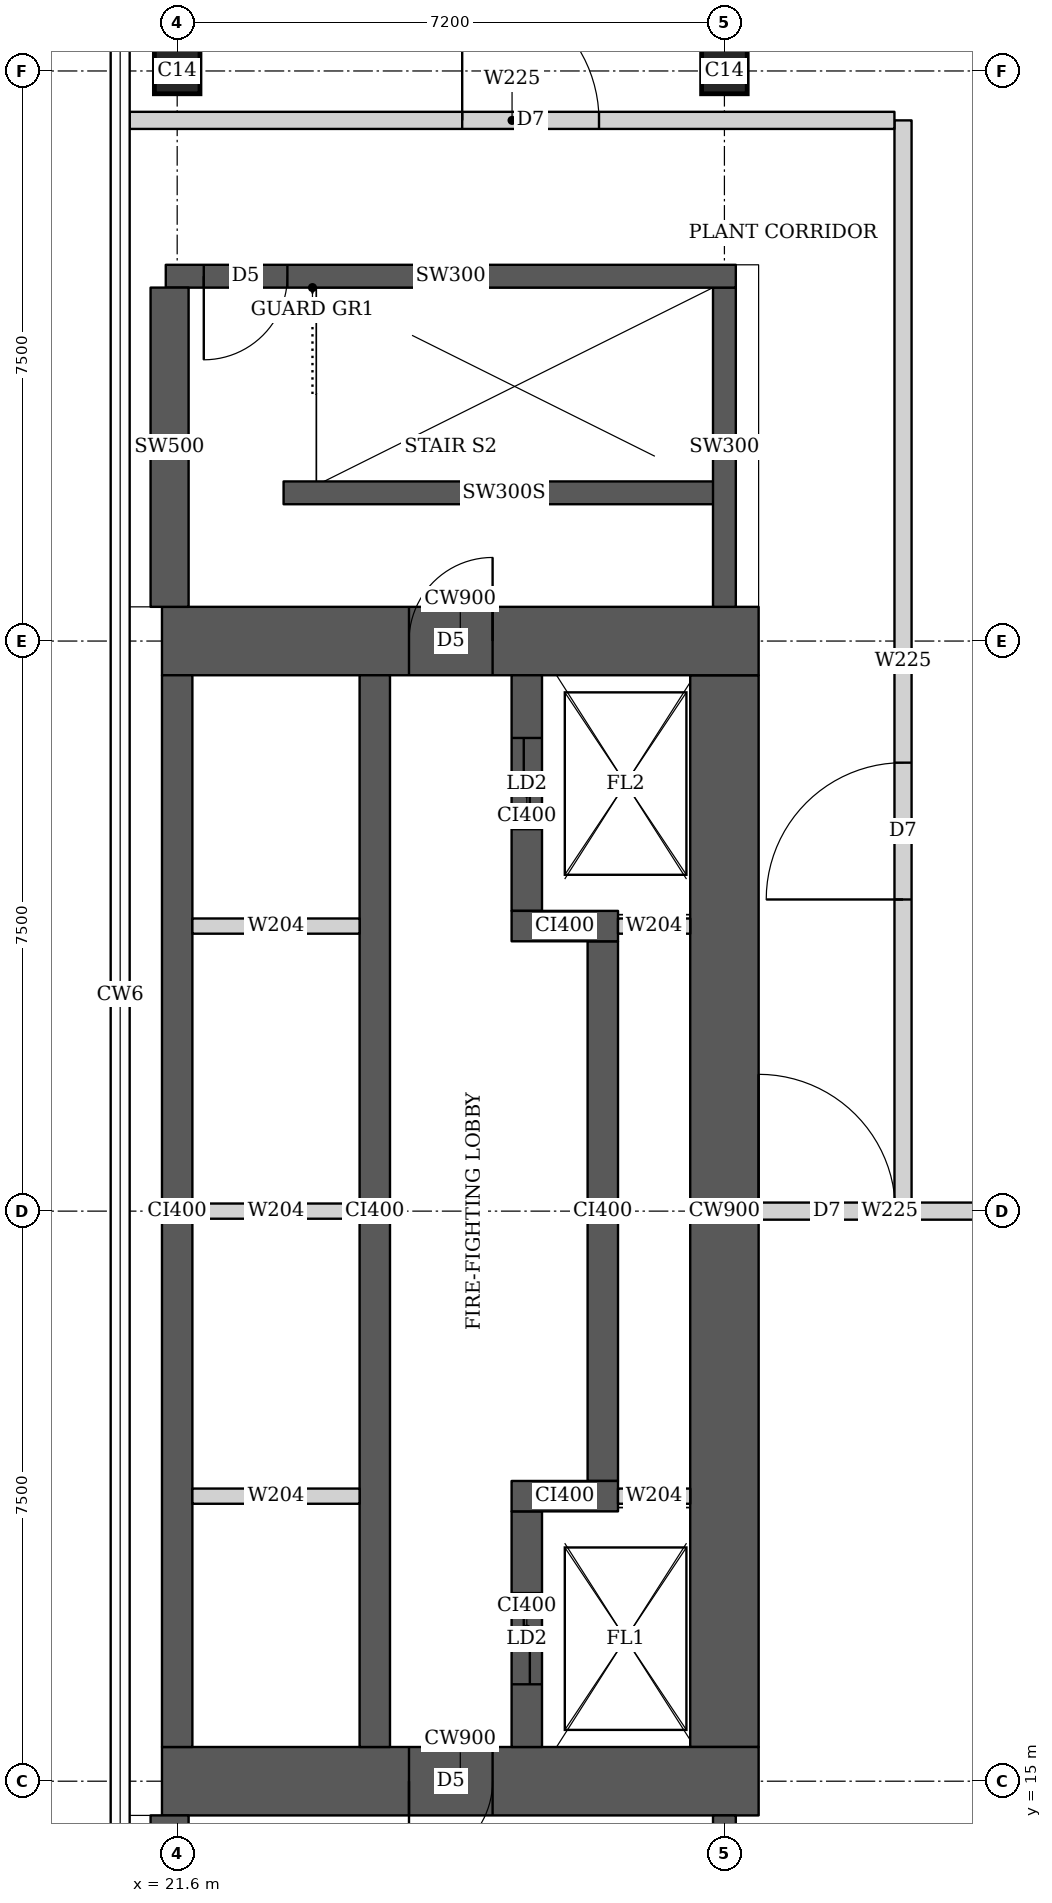
"""IFC4 building model, lengths in metres.
Left out: names, types, materials, properties, quantities, classifications, styles, units other than length and angle.
Written with IfcOpenShell. Run it as: python <this file> out.ifc"""

import sys

from ifc_helpers import new_model, si_unit, direction, frame, frame_2d, origin, origin_2d, place, context, subcontext, project, spatial, rectangle, extrude, element, fill, save


model = new_model("IFC4")
c1 = context("Model", 3, precision=1e-05, world=origin(), true_north=direction((0.0, 1.0)))
c2 = subcontext(c1, "Body", "Model", "MODEL_VIEW")
j1 = project(units=[si_unit("LENGTHUNIT", "METRE"), si_unit("PLANEANGLEUNIT", "RADIAN")], contexts=[c1])
p1 = place(None, origin())
s1 = spatial("IfcSite", under=j1, at=p1, CompositionType="ELEMENT")
p2 = place(p1, origin())
s2 = spatial("IfcBuilding", under=s1, at=p2, CompositionType="ELEMENT")
p3 = place(p2, frame((0.0, 0.0, 301.6)))
s3 = spatial("IfcBuildingStorey", under=s2, at=p3, CompositionType="ELEMENT", Elevation=301.6)
for number, where, z_axis, x_axis in (
    (1, (21.6, 37.5, 0.0), (0.0, 0.0, 1.0), (1.0, 0.0, 0.0)),
    (2, (28.8, 37.5, 0.0), (0.0, 0.0, 1.0), (1.0, 0.0, 0.0)),
):
    element("IfcColumn", number, at=place(p3, frame(where, z_axis=z_axis, x_axis=x_axis)), inside=s3, PredefinedType="COLUMN", context=c2, shape_type="SweptSolid", body=[
        extrude(rectangle(XDim=0.6, YDim=0.6, at=origin_2d()), origin(), (0.0, 0.0, 1.0), 5.6),
    ])
p4 = place(p3, frame((21.4, 15.0, 0.0), z_axis=(0.0, 0.0, 1.0), x_axis=(1.0, 0.0, 0.0)))
e3 = element("IfcWall", 3, at=p4, inside=s3, PredefinedType="SHEAR", context=c2, shape_type="SweptSolid", body=[
    extrude(rectangle(XDim=7.85, YDim=0.9, at=frame_2d((3.925, 0.0))), origin(), (0.0, 0.0, 1.0), 5.6),
])
p5 = place(p4, frame((3.25, 0.0, 0.0)))
e4 = element("IfcOpeningElement", 4, at=p5, cuts=e3, PredefinedType="OPENING", context=c2, shape_type="SweptSolid", body=[
    extrude(rectangle(XDim=1.1, YDim=2.1, at=frame_2d((0.55, 1.05))), frame((0.0, 0.46, 0.0), z_axis=(0.0, -1.0, 0.0), x_axis=(1.0, 0.0, 0.0)), (0.0, 0.0, 1.0), 0.92),
])
p6 = place(p3, frame((21.4, 30.0, 0.0), z_axis=(0.0, 0.0, 1.0), x_axis=(1.0, 0.0, 0.0)))
e5 = element("IfcWall", 5, at=p6, inside=s3, PredefinedType="SHEAR", context=c2, shape_type="SweptSolid", body=[
    extrude(rectangle(XDim=7.85, YDim=0.9, at=frame_2d((3.925, 0.0))), origin(), (0.0, 0.0, 1.0), 5.6),
])
p7 = place(p6, frame((3.25, 0.0, 0.0)))
e6 = element("IfcOpeningElement", 6, at=p7, cuts=e5, PredefinedType="OPENING", context=c2, shape_type="SweptSolid", body=[
    extrude(rectangle(XDim=1.1, YDim=2.1, at=frame_2d((0.55, 1.05))), frame((0.0, 0.46, 0.0), z_axis=(0.0, -1.0, 0.0), x_axis=(1.0, 0.0, 0.0)), (0.0, 0.0, 1.0), 0.92),
])
p8 = place(p3, frame((28.8, 15.45, 0.0), z_axis=(0.0, 0.0, 1.0), x_axis=(0.0, 1.0, 0.0)))
e7 = element("IfcWall", 7, at=p8, inside=s3, PredefinedType="SHEAR", context=c2, shape_type="SweptSolid", body=[
    extrude(rectangle(XDim=14.1, YDim=0.9, at=frame_2d((7.05, 0.0))), origin(), (0.0, 0.0, 1.0), 5.6),
])
for number, where, z_axis, x_axis in (
    (8, (21.6, 15.45, 0.0), (0.0, 0.0, 1.0), (0.0, 1.0, 0.0)),
    (9, (24.2, 15.45, 0.0), (0.0, 0.0, 1.0), (0.0, 1.0, 0.0)),
):
    element("IfcWall", number, at=place(p3, frame(where, z_axis=z_axis, x_axis=x_axis)), inside=s3, PredefinedType="SHEAR", context=c2, shape_type="SweptSolid", body=[
        extrude(rectangle(XDim=14.1, YDim=0.4, at=frame_2d((7.05, 0.0))), origin(), (0.0, 0.0, 1.0), 5.6),
    ])
p9 = place(p3, frame((26.2, 15.45, 0.0), z_axis=(0.0, 0.0, 1.0), x_axis=(0.0, 1.0, 0.0)))
e10 = element("IfcWall", 10, at=p9, inside=s3, PredefinedType="SHEAR", context=c2, shape_type="SweptSolid", body=[
    extrude(rectangle(XDim=3.1, YDim=0.4, at=frame_2d((1.55, 0.0))), origin(), (0.0, 0.0, 1.0), 5.6),
])
p10 = place(p9, frame((0.825, 0.0, 0.0)))
e11 = element("IfcOpeningElement", 11, at=p10, cuts=e10, PredefinedType="OPENING", context=c2, shape_type="SweptSolid", body=[
    extrude(rectangle(XDim=1.2, YDim=2.1, at=frame_2d((0.6, 1.05))), frame((0.0, 0.21, 0.0), z_axis=(0.0, -1.0, 0.0), x_axis=(1.0, 0.0, 0.0)), (0.0, 0.0, 1.0), 0.42),
])
p11 = place(p3, frame((26.0, 18.75, 0.0), z_axis=(0.0, 0.0, 1.0), x_axis=(1.0, 0.0, 0.0)))
e12 = element("IfcWall", 12, at=p11, inside=s3, PredefinedType="SHEAR", context=c2, shape_type="SweptSolid", body=[
    extrude(rectangle(XDim=1.4, YDim=0.4, at=frame_2d((0.7, 0.0))), origin(), (0.0, 0.0, 1.0), 5.6),
])
p12 = place(p3, frame((27.2, 18.95, 0.0), z_axis=(0.0, 0.0, 1.0), x_axis=(0.0, 1.0, 0.0)))
e13 = element("IfcWall", 13, at=p12, inside=s3, PredefinedType="SHEAR", context=c2, shape_type="SweptSolid", body=[
    extrude(rectangle(XDim=7.1, YDim=0.4, at=frame_2d((3.55, 0.0))), origin(), (0.0, 0.0, 1.0), 5.6),
])
p13 = place(p3, frame((26.0, 26.25, 0.0), z_axis=(0.0, 0.0, 1.0), x_axis=(1.0, 0.0, 0.0)))
e14 = element("IfcWall", 14, at=p13, inside=s3, PredefinedType="SHEAR", context=c2, shape_type="SweptSolid", body=[
    extrude(rectangle(XDim=1.4, YDim=0.4, at=frame_2d((0.7, 0.0))), origin(), (0.0, 0.0, 1.0), 5.6),
])
p14 = place(p3, frame((26.2, 26.45, 0.0), z_axis=(0.0, 0.0, 1.0), x_axis=(0.0, 1.0, 0.0)))
e15 = element("IfcWall", 15, at=p14, inside=s3, PredefinedType="SHEAR", context=c2, shape_type="SweptSolid", body=[
    extrude(rectangle(XDim=3.1, YDim=0.4, at=frame_2d((1.55, 0.0))), origin(), (0.0, 0.0, 1.0), 5.6),
])
p15 = place(p14, frame((1.075, 0.0, 0.0)))
e16 = element("IfcOpeningElement", 16, at=p15, cuts=e15, PredefinedType="OPENING", context=c2, shape_type="SweptSolid", body=[
    extrude(rectangle(XDim=1.2, YDim=2.1, at=frame_2d((0.6, 1.05))), frame((0.0, 0.21, 0.0), z_axis=(0.0, -1.0, 0.0), x_axis=(1.0, 0.0, 0.0)), (0.0, 0.0, 1.0), 0.42),
])
p16 = place(p3, frame((21.5, 10.35, 0.0), z_axis=(0.0, 0.0, 1.0), x_axis=(0.0, 1.0, 0.0)))
e17 = element("IfcWall", 17, at=p16, inside=s3, PredefinedType="SHEAR", context=c2, shape_type="SweptSolid", body=[
    extrude(rectangle(XDim=4.2, YDim=0.5, at=frame_2d((2.1, 0.0))), origin(), (0.0, 0.0, 1.0), 5.6),
])
p17 = place(p3, frame((28.8, 10.35, 0.0), z_axis=(0.0, 0.0, 1.0), x_axis=(0.0, 1.0, 0.0)))
e18 = element("IfcWall", 18, at=p17, inside=s3, PredefinedType="SHEAR", context=c2, shape_type="SweptSolid", body=[
    extrude(rectangle(XDim=4.2, YDim=0.3, at=frame_2d((2.1, 0.0))), origin(), (0.0, 0.0, 1.0), 5.6),
])
p18 = place(p3, frame((21.45, 34.8, 0.0), z_axis=(0.0, 0.0, 1.0), x_axis=(1.0, 0.0, 0.0)))
e19 = element("IfcWall", 19, at=p18, inside=s3, PredefinedType="SHEAR", context=c2, shape_type="SweptSolid", body=[
    extrude(rectangle(XDim=7.5, YDim=0.3, at=frame_2d((3.75, 0.0))), origin(), (0.0, 0.0, 1.0), 5.6),
])
p19 = place(p18, frame((0.5, 0.0, 0.0)))
e20 = element("IfcOpeningElement", 20, at=p19, cuts=e19, PredefinedType="OPENING", context=c2, shape_type="SweptSolid", body=[
    extrude(rectangle(XDim=1.1, YDim=2.1, at=frame_2d((0.55, 1.05))), frame((0.0, 0.16, 0.0), z_axis=(0.0, -1.0, 0.0), x_axis=(1.0, 0.0, 0.0)), (0.0, 0.0, 1.0), 0.32),
])
p20 = place(p3, frame((21.5, 30.45, 0.0), z_axis=(0.0, 0.0, 1.0), x_axis=(0.0, 1.0, 0.0)))
e21 = element("IfcWall", 21, at=p20, inside=s3, PredefinedType="SHEAR", context=c2, shape_type="SweptSolid", body=[
    extrude(rectangle(XDim=4.2, YDim=0.5, at=frame_2d((2.1, 0.0))), origin(), (0.0, 0.0, 1.0), 5.6),
])
p21 = place(p3, frame((28.8, 30.45, 0.0), z_axis=(0.0, 0.0, 1.0), x_axis=(0.0, 1.0, 0.0)))
e22 = element("IfcWall", 22, at=p21, inside=s3, PredefinedType="SHEAR", context=c2, shape_type="SweptSolid", body=[
    extrude(rectangle(XDim=4.2, YDim=0.3, at=frame_2d((2.1, 0.0))), origin(), (0.0, 0.0, 1.0), 5.6),
])
p22 = place(p3, frame((29.25, 22.5, 0.0), z_axis=(0.0, 0.0, 1.0), x_axis=(1.0, 0.0, 0.0)))
e23 = element("IfcWall", 23, at=p22, inside=s3, PredefinedType="SOLIDWALL", context=c2, shape_type="SweptSolid", body=[
    extrude(rectangle(XDim=3.449, YDim=0.225, at=frame_2d((1.725, 0.0))), origin(), (0.0, 0.0, 1.0), 5.35),
])
p23 = place(p22, origin())
e24 = element("IfcOpeningElement", 24, at=p23, cuts=e23, PredefinedType="OPENING", context=c2, shape_type="SweptSolid", body=[
    extrude(rectangle(XDim=1.8, YDim=2.4, at=frame_2d((0.9, 1.2))), frame((0.0, 0.123, 0.0), z_axis=(0.0, -1.0, 0.0), x_axis=(1.0, 0.0, 0.0)), (0.0, 0.0, 1.0), 0.245),
])
p24 = place(p3, frame((20.975, 36.85, 0.0), z_axis=(0.0, 0.0, 1.0), x_axis=(1.0, 0.0, 0.0)))
e25 = element("IfcWall", 25, at=p24, inside=s3, PredefinedType="SOLIDWALL", context=c2, shape_type="SweptSolid", body=[
    extrude(rectangle(XDim=10.062, YDim=0.225, at=frame_2d((5.031, 0.0))), origin(), (0.0, 0.0, 1.0), 5.35),
])
p25 = place(p24, frame((4.375, 0.0, 0.0)))
e26 = element("IfcOpeningElement", 26, at=p25, cuts=e25, PredefinedType="OPENING", context=c2, shape_type="SweptSolid", body=[
    extrude(rectangle(XDim=1.8, YDim=2.4, at=frame_2d((0.9, 1.2))), frame((0.0, 0.123, 0.0), z_axis=(0.0, -1.0, 0.0), x_axis=(1.0, 0.0, 0.0)), (0.0, 0.0, 1.0), 0.245),
])
p26 = place(p3, frame((31.15, 22.613, 0.0), z_axis=(0.0, 0.0, 1.0), x_axis=(0.0, 1.0, 0.0)))
e27 = element("IfcWall", 27, at=p26, inside=s3, PredefinedType="SOLIDWALL", context=c2, shape_type="SweptSolid", body=[
    extrude(rectangle(XDim=14.237, YDim=0.225, at=frame_2d((7.119, 0.0))), origin(), (0.0, 0.0, 1.0), 5.35),
])
p27 = place(p26, frame((3.987, 0.0, 0.0)))
e28 = element("IfcOpeningElement", 28, at=p27, cuts=e27, PredefinedType="OPENING", context=c2, shape_type="SweptSolid", body=[
    extrude(rectangle(XDim=1.8, YDim=2.4, at=frame_2d((0.9, 1.2))), frame((0.0, 0.123, 0.0), z_axis=(0.0, -1.0, 0.0), x_axis=(1.0, 0.0, 0.0)), (0.0, 0.0, 1.0), 0.245),
])
p28 = place(p3, frame((23.0, 31.95, 0.0), z_axis=(0.0, 0.0, 1.0), x_axis=(1.0, 0.0, 0.0)))
e29 = element("IfcWall", 29, at=p28, inside=s3, PredefinedType="SHEAR", context=c2, shape_type="SweptSolid", body=[
    extrude(rectangle(XDim=5.8, YDim=0.3, at=frame_2d((2.9, 0.0))), origin(), (0.0, 0.0, 1.0), 5.35),
])
for number, where, z_axis, x_axis in (
    (30, (21.8, 18.75, 0.0), (0.0, 0.0, 1.0), (1.0, 0.0, 0.0)),
    (31, (21.8, 22.5, 0.0), (0.0, 0.0, 1.0), (1.0, 0.0, 0.0)),
    (32, (21.8, 26.25, 0.0), (0.0, 0.0, 1.0), (1.0, 0.0, 0.0)),
):
    element("IfcWall", number, at=place(p3, frame(where, z_axis=z_axis, x_axis=x_axis)), inside=s3, PredefinedType="SOLIDWALL", context=c2, shape_type="SweptSolid", body=[
        extrude(rectangle(XDim=2.2, YDim=0.2, at=frame_2d((1.1, 0.0))), origin(), (0.0, 0.0, 1.0), 5.35),
    ])
for number, where, z_axis, x_axis in (
    (33, (27.4, 18.75, 0.0), (0.0, 0.0, 1.0), (1.0, 0.0, 0.0)),
    (34, (27.4, 26.25, 0.0), (0.0, 0.0, 1.0), (1.0, 0.0, 0.0)),
):
    element("IfcWall", number, at=place(p3, frame(where, z_axis=z_axis, x_axis=x_axis)), inside=s3, PredefinedType="SOLIDWALL", context=c2, shape_type="SweptSolid", body=[
        extrude(rectangle(XDim=0.95, YDim=0.2, at=frame_2d((0.475, 0.0))), origin(), (0.0, 0.0, 1.0), 5.35),
    ])
p29 = place(p23, origin())
e35 = element("IfcDoor", 35, at=p29, inside=s3, OperationType="DOUBLE_DOOR_SINGLE_SWING", PredefinedType="DOOR", context=c2, shape_type="SweptSolid", body=[
    extrude(rectangle(XDim=1.8, YDim=2.4, at=frame_2d((0.9, 1.2))), frame((0.0, 0.025, 0.0), z_axis=(0.0, -1.0, 0.0), x_axis=(1.0, 0.0, 0.0)), (0.0, 0.0, 1.0), 0.05),
])
fill(e24, e35)
p30 = place(p27, origin())
e36 = element("IfcDoor", 36, at=p30, inside=s3, OperationType="DOUBLE_DOOR_SINGLE_SWING", PredefinedType="DOOR", context=c2, shape_type="SweptSolid", body=[
    extrude(rectangle(XDim=1.8, YDim=2.4, at=frame_2d((0.9, 1.2))), frame((0.0, 0.025, 0.0), z_axis=(0.0, -1.0, 0.0), x_axis=(1.0, 0.0, 0.0)), (0.0, 0.0, 1.0), 0.05),
])
fill(e28, e36)
p31 = place(p25, origin())
e37 = element("IfcDoor", 37, at=p31, inside=s3, OperationType="DOUBLE_DOOR_SINGLE_SWING", PredefinedType="DOOR", context=c2, shape_type="SweptSolid", body=[
    extrude(rectangle(XDim=1.8, YDim=2.4, at=frame_2d((0.9, 1.2))), frame((0.0, 0.025, 0.0), z_axis=(0.0, -1.0, 0.0), x_axis=(1.0, 0.0, 0.0)), (0.0, 0.0, 1.0), 0.05),
])
fill(e26, e37)
p32 = place(p5, origin())
e38 = element("IfcDoor", 38, at=p32, inside=s3, OperationType="SINGLE_SWING_RIGHT", PredefinedType="DOOR", context=c2, shape_type="SweptSolid", body=[
    extrude(rectangle(XDim=1.1, YDim=2.1, at=frame_2d((0.55, 1.05))), frame((0.0, 0.025, 0.0), z_axis=(0.0, -1.0, 0.0), x_axis=(1.0, 0.0, 0.0)), (0.0, 0.0, 1.0), 0.05),
])
fill(e4, e38)
p33 = place(p7, origin())
e39 = element("IfcDoor", 39, at=p33, inside=s3, OperationType="SINGLE_SWING_RIGHT", PredefinedType="DOOR", context=c2, shape_type="SweptSolid", body=[
    extrude(rectangle(XDim=1.1, YDim=2.1, at=frame_2d((0.55, 1.05))), frame((0.0, 0.025, 0.0), z_axis=(0.0, -1.0, 0.0), x_axis=(1.0, 0.0, 0.0)), (0.0, 0.0, 1.0), 0.05),
])
fill(e6, e39)
p34 = place(p10, origin())
e40 = element("IfcDoor", 40, at=p34, inside=s3, OperationType="DOUBLE_DOOR_SLIDING", PredefinedType="DOOR", context=c2, shape_type="SweptSolid", body=[
    extrude(rectangle(XDim=1.2, YDim=2.1, at=frame_2d((0.6, 1.05))), frame((0.0, 0.025, 0.0), z_axis=(0.0, -1.0, 0.0), x_axis=(1.0, 0.0, 0.0)), (0.0, 0.0, 1.0), 0.05),
])
fill(e11, e40)
p35 = place(p15, origin())
e41 = element("IfcDoor", 41, at=p35, inside=s3, OperationType="DOUBLE_DOOR_SLIDING", PredefinedType="DOOR", context=c2, shape_type="SweptSolid", body=[
    extrude(rectangle(XDim=1.2, YDim=2.1, at=frame_2d((0.6, 1.05))), frame((0.0, 0.025, 0.0), z_axis=(0.0, -1.0, 0.0), x_axis=(1.0, 0.0, 0.0)), (0.0, 0.0, 1.0), 0.05),
])
fill(e16, e41)
p36 = place(p19, origin())
e42 = element("IfcDoor", 42, at=p36, inside=s3, OperationType="SINGLE_SWING_RIGHT", PredefinedType="DOOR", context=c2, shape_type="SweptSolid", body=[
    extrude(rectangle(XDim=1.1, YDim=2.1, at=frame_2d((0.55, 1.05))), frame((0.0, 0.025, 0.0), z_axis=(0.0, -1.0, 0.0), x_axis=(1.0, 0.0, 0.0)), (0.0, 0.0, 1.0), 0.05),
])
fill(e20, e42)
save(model, sys.argv[1])
